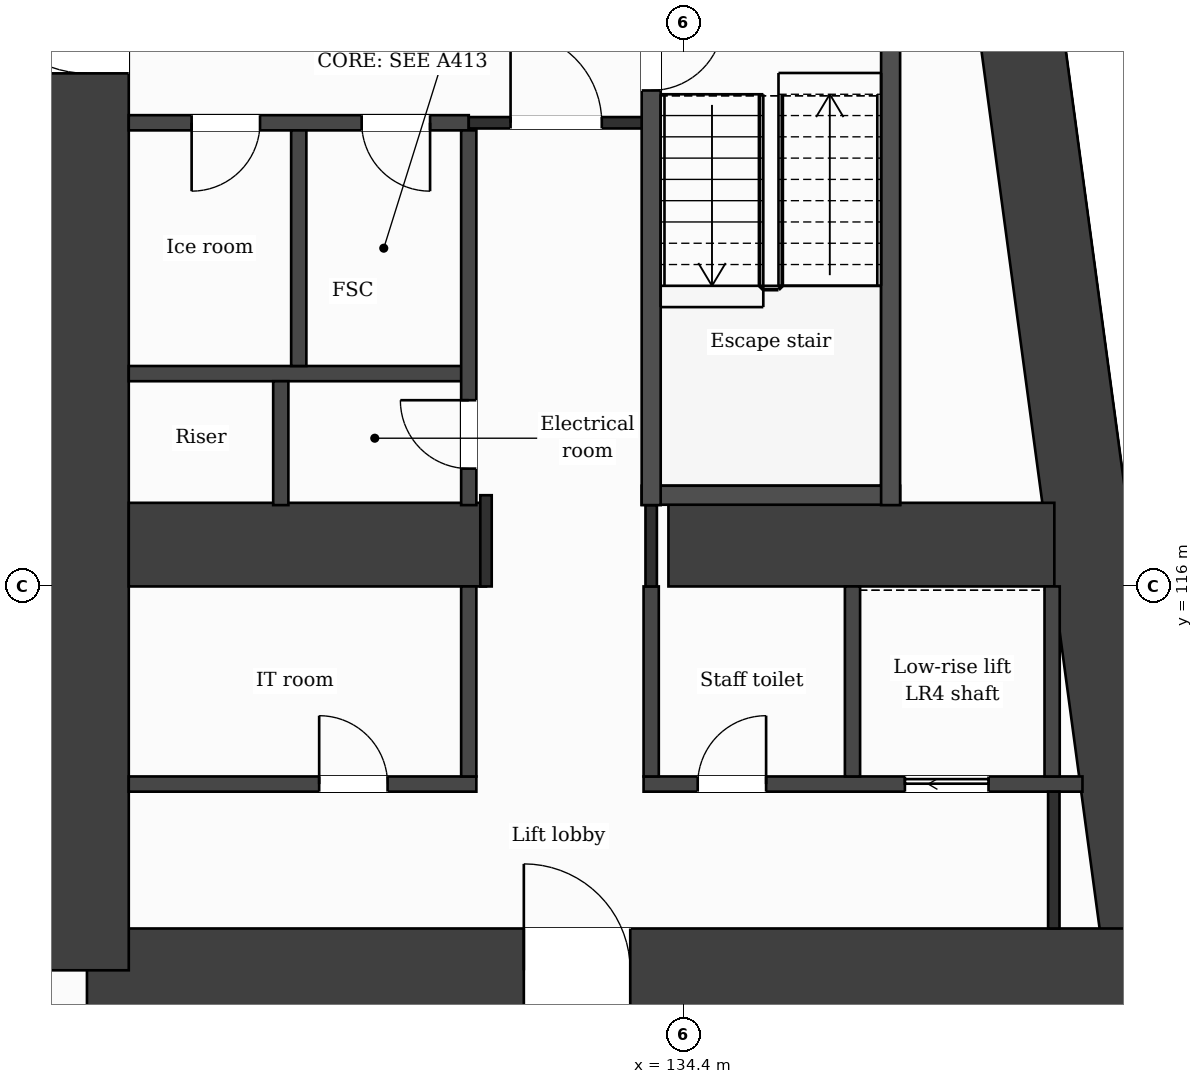
"""IFC4 building model, lengths in metres.
Left out: names, types, materials, properties, quantities, classifications, styles, units other than length and angle.
Written with IfcOpenShell. Run it as: python <this file> out.ifc"""

import sys

from ifc_helpers import new_model, si_unit, direction, frame, frame_2d, origin, place, context, subcontext, project, spatial, rectangle, extrude, element, fill, save


model = new_model("IFC4")
c1 = context("Model", 3, precision=1e-05, world=origin(), true_north=direction((0.0, 1.0)))
c2 = subcontext(c1, "Body", "Model", "MODEL_VIEW")
j1 = project(units=[si_unit("LENGTHUNIT", "METRE"), si_unit("PLANEANGLEUNIT", "RADIAN")], contexts=[c1])
p1 = place(None, origin())
s1 = spatial("IfcSite", under=j1, at=p1, CompositionType="ELEMENT")
p2 = place(p1, origin())
s2 = spatial("IfcBuilding", under=s1, at=p2, CompositionType="ELEMENT")
p3 = place(p2, frame((0.0, 0.0, 60.0)))
s3 = spatial("IfcBuildingStorey", under=s2, at=p3, CompositionType="ELEMENT", Elevation=60.0)
p4 = place(p3, frame((137.688, 131.85, 0.0), z_axis=(0.0, 0.0, 1.0), x_axis=(0.133411793472, -0.991060691059, 0.0)))
e1 = element("IfcWall", 1, at=p4, inside=s3, PredefinedType="SHEAR", context=c2, shape_type="SweptSolid", body=[
    extrude(rectangle(XDim=21.089, YDim=1.1, at=frame_2d((10.544, 0.0))), origin(), (0.0, 0.0, 1.0), 3.5),
])
p5 = place(p3, frame((140.502, 110.95, 0.0), z_axis=(0.0, 0.0, 1.0), x_axis=(-1.0, 0.0, 0.0)))
e2 = element("IfcWall", 2, at=p5, inside=s3, PredefinedType="SHEAR", context=c2, shape_type="SweptSolid", body=[
    extrude(rectangle(XDim=13.952, YDim=1.1, at=frame_2d((6.976, 0.0))), origin(), (0.0, 0.0, 1.0), 3.5),
])
p6 = place(p5, frame((6.804, 0.0, 0.0)))
e3 = element("IfcOpeningElement", 3, at=p6, cuts=e2, PredefinedType="OPENING", context=c2, shape_type="SweptSolid", body=[
    extrude(rectangle(XDim=1.4, YDim=2.1, at=frame_2d((0.7, 1.05))), frame((0.0, 0.56, 0.0), z_axis=(0.0, -1.0, 0.0), x_axis=(1.0, 0.0, 0.0)), (0.0, 0.0, 1.0), 1.12),
])
p7 = place(p3, frame((126.55, 110.95, 0.0), z_axis=(0.0, 0.0, 1.0), x_axis=(0.0, 1.0, 0.0)))
e4 = element("IfcWall", 4, at=p7, inside=s3, PredefinedType="SHEAR", context=c2, shape_type="SweptSolid", body=[
    extrude(rectangle(XDim=20.9, YDim=1.1, at=frame_2d((10.45, 0.0))), origin(), (0.0, 0.0, 1.0), 3.5),
])
p8 = place(p7, frame((11.8, 0.0, 0.0)))
e5 = element("IfcOpeningElement", 5, at=p8, cuts=e4, PredefinedType="OPENING", context=c2, shape_type="SweptSolid", body=[
    extrude(rectangle(XDim=1.4, YDim=2.1, at=frame_2d((0.7, 1.05))), frame((0.0, 0.56, 0.0), z_axis=(0.0, -1.0, 0.0), x_axis=(1.0, 0.0, 0.0)), (0.0, 0.0, 1.0), 1.12),
])
p9 = place(p3, frame((127.1, 116.55, 0.0), z_axis=(0.0, 0.0, 1.0), x_axis=(1.0, 0.0, 0.0)))
e6 = element("IfcWall", 6, at=p9, inside=s3, PredefinedType="SHEAR", context=c2, shape_type="SweptSolid", body=[
    extrude(rectangle(XDim=4.7, YDim=1.1, at=frame_2d((2.35, 0.0))), origin(), (0.0, 0.0, 1.0), 3.5),
])
p10 = place(p3, frame((134.2, 116.55, 0.0), z_axis=(0.0, 0.0, 1.0), x_axis=(1.0, 0.0, 0.0)))
e7 = element("IfcWall", 7, at=p10, inside=s3, PredefinedType="SHEAR", context=c2, shape_type="SweptSolid", body=[
    extrude(rectangle(XDim=5.077, YDim=1.1, at=frame_2d((2.539, 0.0))), origin(), (0.0, 0.0, 1.0), 3.5),
])
p11 = place(p3, frame((127.1, 113.4, 0.0), z_axis=(0.0, 0.0, 1.0), x_axis=(1.0, 0.0, 0.0)))
e8 = element("IfcWall", 8, at=p11, inside=s3, PredefinedType="PARTITIONING", context=c2, shape_type="SweptSolid", body=[
    extrude(rectangle(XDim=4.573, YDim=0.2, at=frame_2d((2.287, 0.0))), origin(), (0.0, 0.0, 1.0), 3.18),
])
p12 = place(p11, frame((2.505, 0.0, 0.0)))
e9 = element("IfcOpeningElement", 9, at=p12, cuts=e8, PredefinedType="OPENING", context=c2, shape_type="SweptSolid", body=[
    extrude(rectangle(XDim=0.9, YDim=2.1, at=frame_2d((0.45, 1.05))), frame((0.0, 0.11, 0.0), z_axis=(0.0, -1.0, 0.0), x_axis=(1.0, 0.0, 0.0)), (0.0, 0.0, 1.0), 0.22),
])
p13 = place(p3, frame((133.873, 113.4, 0.0), z_axis=(0.0, 0.0, 1.0), x_axis=(1.0, 0.0, 0.0)))
e10 = element("IfcWall", 10, at=p13, inside=s3, PredefinedType="PARTITIONING", context=c2, shape_type="SweptSolid", body=[
    extrude(rectangle(XDim=5.774, YDim=0.2, at=frame_2d((2.887, 0.0))), origin(), (0.0, 0.0, 1.0), 3.18),
])
p14 = place(p13, frame((3.438, 0.0, 0.0)))
e11 = element("IfcOpeningElement", 11, at=p14, cuts=e10, PredefinedType="OPENING", context=c2, shape_type="SweptSolid", body=[
    extrude(rectangle(XDim=1.1, YDim=2.1, at=frame_2d((0.55, 1.05))), frame((0.0, 0.11, 0.0), z_axis=(0.0, -1.0, 0.0), x_axis=(1.0, 0.0, 0.0)), (0.0, 0.0, 1.0), 0.22),
])
p15 = place(p13, frame((0.712, 0.0, 0.0)))
e12 = element("IfcOpeningElement", 12, at=p15, cuts=e10, PredefinedType="OPENING", context=c2, shape_type="SweptSolid", body=[
    extrude(rectangle(XDim=0.9, YDim=2.1, at=frame_2d((0.45, 1.05))), frame((0.0, 0.11, 0.0), z_axis=(0.0, -1.0, 0.0), x_axis=(1.0, 0.0, 0.0)), (0.0, 0.0, 1.0), 0.22),
])
p16 = place(p3, frame((133.848, 117.2, 0.0), z_axis=(0.0, 0.0, 1.0), x_axis=(1.0, 0.0, 0.0)))
e13 = element("IfcWall", 13, at=p16, inside=s3, PredefinedType="PARTITIONING", context=c2, shape_type="SweptSolid", body=[
    extrude(rectangle(XDim=3.4, YDim=0.25, at=frame_2d((1.7, 0.0))), origin(), (0.0, 0.0, 1.0), 3.18),
])
p17 = place(p3, frame((127.1, 118.8, 0.0), z_axis=(0.0, 0.0, 1.0), x_axis=(1.0, 0.0, 0.0)))
e14 = element("IfcWall", 14, at=p17, inside=s3, PredefinedType="PARTITIONING", context=c2, shape_type="SweptSolid", body=[
    extrude(rectangle(XDim=4.473, YDim=0.2, at=frame_2d((2.236, 0.0))), origin(), (0.0, 0.0, 1.0), 3.18),
])
p18 = place(p3, frame((127.1, 122.1, 0.0), z_axis=(0.0, 0.0, 1.0), x_axis=(1.0, 0.0, 0.0)))
e15 = element("IfcWall", 15, at=p18, inside=s3, PredefinedType="PARTITIONING", context=c2, shape_type="SweptSolid", body=[
    extrude(rectangle(XDim=4.473, YDim=0.2, at=frame_2d((2.236, 0.0))), origin(), (0.0, 0.0, 1.0), 3.18),
])
p19 = place(p18, frame((3.064, 0.0, 0.0)))
e16 = element("IfcOpeningElement", 16, at=p19, cuts=e15, PredefinedType="OPENING", context=c2, shape_type="SweptSolid", body=[
    extrude(rectangle(XDim=0.9, YDim=2.1, at=frame_2d((0.45, 1.05))), frame((0.0, 0.11, 0.0), z_axis=(0.0, -1.0, 0.0), x_axis=(1.0, 0.0, 0.0)), (0.0, 0.0, 1.0), 0.22),
])
p20 = place(p18, frame((0.827, 0.0, 0.0)))
e17 = element("IfcOpeningElement", 17, at=p20, cuts=e15, PredefinedType="OPENING", context=c2, shape_type="SweptSolid", body=[
    extrude(rectangle(XDim=0.9, YDim=2.1, at=frame_2d((0.45, 1.05))), frame((0.0, 0.11, 0.0), z_axis=(0.0, -1.0, 0.0), x_axis=(1.0, 0.0, 0.0)), (0.0, 0.0, 1.0), 0.22),
])
p21 = place(p3, frame((131.573, 122.1, 0.0), z_axis=(0.0, 0.0, 1.0), x_axis=(1.0, 0.0, 0.0)))
e18 = element("IfcWall", 18, at=p21, inside=s3, PredefinedType="PARTITIONING", context=c2, shape_type="SweptSolid", body=[
    extrude(rectangle(XDim=2.4, YDim=0.15, at=frame_2d((1.2, 0.0))), origin(), (0.0, 0.0, 1.0), 3.18),
])
p22 = place(p21, frame((0.55, 0.0, 0.0)))
e19 = element("IfcOpeningElement", 19, at=p22, cuts=e18, PredefinedType="OPENING", context=c2, shape_type="SweptSolid", body=[
    extrude(rectangle(XDim=1.2, YDim=2.1, at=frame_2d((0.6, 1.05))), frame((0.0, 0.085, 0.0), z_axis=(0.0, -1.0, 0.0), x_axis=(1.0, 0.0, 0.0)), (0.0, 0.0, 1.0), 0.17),
])
p23 = place(p3, frame((129.1, 117.07, 0.0), z_axis=(0.0, 0.0, 1.0), x_axis=(0.0, 1.0, 0.0)))
e20 = element("IfcWall", 20, at=p23, inside=s3, PredefinedType="PARTITIONING", context=c2, shape_type="SweptSolid", body=[
    extrude(rectangle(XDim=1.63, YDim=0.2, at=frame_2d((0.815, 0.0))), origin(), (0.0, 0.0, 1.0), 3.18),
])
p24 = place(p3, frame((129.336, 118.9, 0.0), z_axis=(0.0, 0.0, 1.0), x_axis=(0.0, 1.0, 0.0)))
e21 = element("IfcWall", 21, at=p24, inside=s3, PredefinedType="PARTITIONING", context=c2, shape_type="SweptSolid", body=[
    extrude(rectangle(XDim=3.1, YDim=0.2, at=frame_2d((1.55, 0.0))), origin(), (0.0, 0.0, 1.0), 3.18),
])
p25 = place(p3, frame((131.573, 113.5, 0.0), z_axis=(0.0, 0.0, 1.0), x_axis=(0.0, 1.0, 0.0)))
e22 = element("IfcWall", 22, at=p25, inside=s3, PredefinedType="PARTITIONING", context=c2, shape_type="SweptSolid", body=[
    extrude(rectangle(XDim=2.5, YDim=0.2, at=frame_2d((1.25, 0.0))), origin(), (0.0, 0.0, 1.0), 3.18),
])
p26 = place(p3, frame((131.573, 117.07, 0.0), z_axis=(0.0, 0.0, 1.0), x_axis=(0.0, 1.0, 0.0)))
e23 = element("IfcWall", 23, at=p26, inside=s3, PredefinedType="PARTITIONING", context=c2, shape_type="SweptSolid", body=[
    extrude(rectangle(XDim=4.93, YDim=0.2, at=frame_2d((2.465, 0.0))), origin(), (0.0, 0.0, 1.0), 3.18),
])
p27 = place(p26, frame((0.48, 0.0, 0.0)))
e24 = element("IfcOpeningElement", 24, at=p27, cuts=e23, PredefinedType="OPENING", context=c2, shape_type="SweptSolid", body=[
    extrude(rectangle(XDim=0.9, YDim=2.1, at=frame_2d((0.45, 1.05))), frame((0.0, 0.11, 0.0), z_axis=(0.0, -1.0, 0.0), x_axis=(1.0, 0.0, 0.0)), (0.0, 0.0, 1.0), 0.22),
])
p28 = place(p3, frame((131.8, 116.0, 0.0), z_axis=(0.0, 0.0, 1.0), x_axis=(0.0, 1.0, 0.0)))
e25 = element("IfcWall", 25, at=p28, inside=s3, PredefinedType="PARTITIONING", context=c2, shape_type="SweptSolid", body=[
    extrude(rectangle(XDim=1.2, YDim=0.15, at=frame_2d((0.6, 0.0))), origin(), (0.0, 0.0, 1.0), 3.18),
])
p29 = place(p3, frame((133.973, 113.5, 0.0), z_axis=(0.0, 0.0, 1.0), x_axis=(0.0, 1.0, 0.0)))
e26 = element("IfcWall", 26, at=p29, inside=s3, PredefinedType="PARTITIONING", context=c2, shape_type="SweptSolid", body=[
    extrude(rectangle(XDim=2.5, YDim=0.2, at=frame_2d((1.25, 0.0))), origin(), (0.0, 0.0, 1.0), 3.18),
])
p30 = place(p3, frame((133.973, 116.0, 0.0), z_axis=(0.0, 0.0, 1.0), x_axis=(0.0, 1.0, 0.0)))
e27 = element("IfcWall", 27, at=p30, inside=s3, PredefinedType="PARTITIONING", context=c2, shape_type="SweptSolid", body=[
    extrude(rectangle(XDim=1.07, YDim=0.15, at=frame_2d((0.535, 0.0))), origin(), (0.0, 0.0, 1.0), 3.18),
])
p31 = place(p3, frame((133.973, 117.07, 0.0), z_axis=(0.0, 0.0, 1.0), x_axis=(0.0, 1.0, 0.0)))
e28 = element("IfcWall", 28, at=p31, inside=s3, PredefinedType="PARTITIONING", context=c2, shape_type="SweptSolid", body=[
    extrude(rectangle(XDim=6.755, YDim=0.25, at=frame_2d((3.377, 0.0))), origin(), (0.0, 0.0, 1.0), 3.18),
])
p32 = place(p31, frame((5.455, 0.0, 0.0)))
e29 = element("IfcOpeningElement", 29, at=p32, cuts=e28, PredefinedType="OPENING", context=c2, shape_type="SweptSolid", body=[
    extrude(rectangle(XDim=0.95, YDim=2.1, at=frame_2d((0.475, 1.05))), frame((0.0, 0.135, 0.0), z_axis=(0.0, -1.0, 0.0), x_axis=(1.0, 0.0, 0.0)), (0.0, 0.0, 1.0), 0.27),
])
p33 = place(p3, frame((136.622, 113.5, 0.0), z_axis=(0.0, 0.0, 1.0), x_axis=(0.0, 1.0, 0.0)))
e30 = element("IfcWall", 30, at=p33, inside=s3, PredefinedType="PARTITIONING", context=c2, shape_type="SweptSolid", body=[
    extrude(rectangle(XDim=2.5, YDim=0.2, at=frame_2d((1.25, 0.0))), origin(), (0.0, 0.0, 1.0), 3.18),
])
p34 = place(p3, frame((137.123, 117.07, 0.0), z_axis=(0.0, 0.0, 1.0), x_axis=(0.0, 1.0, 0.0)))
e31 = element("IfcWall", 31, at=p34, inside=s3, PredefinedType="PARTITIONING", context=c2, shape_type="SweptSolid", body=[
    extrude(rectangle(XDim=6.755, YDim=0.25, at=frame_2d((3.377, 0.0))), origin(), (0.0, 0.0, 1.0), 3.18),
])
p35 = place(p3, frame((139.248, 113.5, 0.0), z_axis=(0.0, 0.0, 1.0), x_axis=(0.0, 1.0, 0.0)))
e32 = element("IfcWall", 32, at=p35, inside=s3, PredefinedType="PARTITIONING", context=c2, shape_type="SweptSolid", body=[
    extrude(rectangle(XDim=2.5, YDim=0.2, at=frame_2d((1.25, 0.0))), origin(), (0.0, 0.0, 1.0), 3.18),
])
p36 = place(p3, frame((139.27, 111.5, 0.0), z_axis=(0.0, 0.0, 1.0), x_axis=(0.0, 1.0, 0.0)))
e33 = element("IfcWall", 33, at=p36, inside=s3, PredefinedType="PARTITIONING", context=c2, shape_type="SweptSolid", body=[
    extrude(rectangle(XDim=1.8, YDim=0.15, at=frame_2d((0.9, 0.0))), origin(), (0.0, 0.0, 1.0), 3.18),
])
p37 = place(p22, origin())
e34 = element("IfcDoor", 34, at=p37, inside=s3, OperationType="SINGLE_SWING_LEFT", PredefinedType="DOOR", context=c2, shape_type="SweptSolid", body=[
    extrude(rectangle(XDim=1.2, YDim=2.1, at=frame_2d((0.6, 1.05))), frame((0.0, 0.025, 0.0), z_axis=(0.0, -1.0, 0.0), x_axis=(1.0, 0.0, 0.0)), (0.0, 0.0, 1.0), 0.05),
])
fill(e19, e34)
p38 = place(p19, origin())
e35 = element("IfcDoor", 35, at=p38, inside=s3, OperationType="SINGLE_SWING_RIGHT", PredefinedType="DOOR", context=c2, shape_type="SweptSolid", body=[
    extrude(rectangle(XDim=0.9, YDim=2.1, at=frame_2d((0.45, 1.05))), frame((0.0, 0.025, 0.0), z_axis=(0.0, -1.0, 0.0), x_axis=(1.0, 0.0, 0.0)), (0.0, 0.0, 1.0), 0.05),
])
fill(e16, e35)
p39 = place(p20, origin())
e36 = element("IfcDoor", 36, at=p39, inside=s3, OperationType="SINGLE_SWING_LEFT", PredefinedType="DOOR", context=c2, shape_type="SweptSolid", body=[
    extrude(rectangle(XDim=0.9, YDim=2.1, at=frame_2d((0.45, 1.05))), frame((0.0, 0.025, 0.0), z_axis=(0.0, -1.0, 0.0), x_axis=(1.0, 0.0, 0.0)), (0.0, 0.0, 1.0), 0.05),
])
fill(e17, e36)
p40 = place(p32, origin())
e37 = element("IfcDoor", 37, at=p40, inside=s3, OperationType="SINGLE_SWING_RIGHT", PredefinedType="DOOR", context=c2, shape_type="SweptSolid", body=[
    extrude(rectangle(XDim=0.95, YDim=2.1, at=frame_2d((0.475, 1.05))), frame((0.0, 0.025, 0.0), z_axis=(0.0, -1.0, 0.0), x_axis=(1.0, 0.0, 0.0)), (0.0, 0.0, 1.0), 0.05),
])
fill(e29, e37)
p41 = place(p27, origin())
e38 = element("IfcDoor", 38, at=p41, inside=s3, OperationType="SINGLE_SWING_RIGHT", PredefinedType="DOOR", context=c2, shape_type="SweptSolid", body=[
    extrude(rectangle(XDim=0.9, YDim=2.1, at=frame_2d((0.45, 1.05))), frame((0.0, 0.025, 0.0), z_axis=(0.0, -1.0, 0.0), x_axis=(1.0, 0.0, 0.0)), (0.0, 0.0, 1.0), 0.05),
])
fill(e24, e38)
p42 = place(p14, origin())
e39 = element("IfcDoor", 39, at=p42, inside=s3, OperationType="SLIDING_TO_LEFT", PredefinedType="DOOR", context=c2, shape_type="SweptSolid", body=[
    extrude(rectangle(XDim=1.1, YDim=2.1, at=frame_2d((0.55, 1.05))), frame((0.0, 0.025, 0.0), z_axis=(0.0, -1.0, 0.0), x_axis=(1.0, 0.0, 0.0)), (0.0, 0.0, 1.0), 0.05),
])
fill(e11, e39)
p43 = place(p15, origin())
e40 = element("IfcDoor", 40, at=p43, inside=s3, OperationType="SINGLE_SWING_RIGHT", PredefinedType="DOOR", context=c2, shape_type="SweptSolid", body=[
    extrude(rectangle(XDim=0.9, YDim=2.1, at=frame_2d((0.45, 1.05))), frame((0.0, 0.025, 0.0), z_axis=(0.0, -1.0, 0.0), x_axis=(1.0, 0.0, 0.0)), (0.0, 0.0, 1.0), 0.05),
])
fill(e12, e40)
p44 = place(p12, origin())
e41 = element("IfcDoor", 41, at=p44, inside=s3, OperationType="SINGLE_SWING_LEFT", PredefinedType="DOOR", context=c2, shape_type="SweptSolid", body=[
    extrude(rectangle(XDim=0.9, YDim=2.1, at=frame_2d((0.45, 1.05))), frame((0.0, 0.025, 0.0), z_axis=(0.0, -1.0, 0.0), x_axis=(1.0, 0.0, 0.0)), (0.0, 0.0, 1.0), 0.05),
])
fill(e9, e41)
p45 = place(p6, origin())
e42 = element("IfcDoor", 42, at=p45, inside=s3, OperationType="SINGLE_SWING_RIGHT", PredefinedType="DOOR", context=c2, shape_type="SweptSolid", body=[
    extrude(rectangle(XDim=1.4, YDim=2.1, at=frame_2d((0.7, 1.05))), frame((0.0, 0.025, 0.0), z_axis=(0.0, -1.0, 0.0), x_axis=(1.0, 0.0, 0.0)), (0.0, 0.0, 1.0), 0.05),
])
fill(e3, e42)
p46 = place(p8, origin())
e43 = element("IfcDoor", 43, at=p46, inside=s3, OperationType="SINGLE_SWING_RIGHT", PredefinedType="DOOR", context=c2, shape_type="SweptSolid", body=[
    extrude(rectangle(XDim=1.4, YDim=2.1, at=frame_2d((0.7, 1.05))), frame((0.0, 0.025, 0.0), z_axis=(0.0, -1.0, 0.0), x_axis=(1.0, 0.0, 0.0)), (0.0, 0.0, 1.0), 0.05),
])
fill(e5, e43)
save(model, sys.argv[1])
